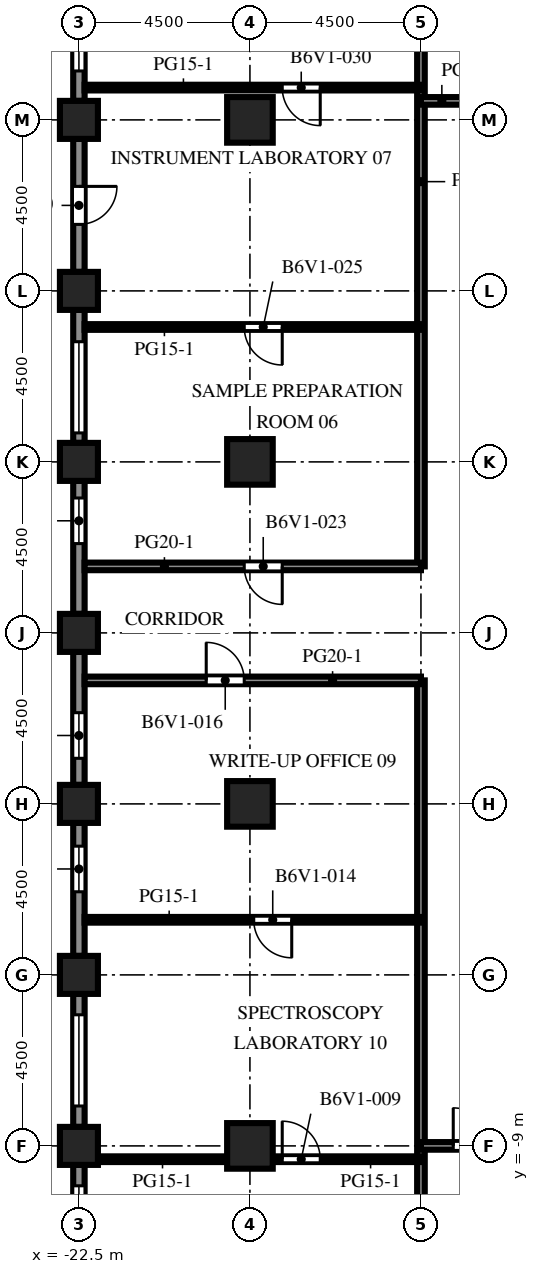
"""IFC4 building model, lengths in metres.
Left out: names, types, materials, properties, quantities, classifications, styles, units other than length and angle.
Written with IfcOpenShell. Run it as: python <this file> out.ifc"""

import sys

from ifc_helpers import new_model, si_unit, direction, frame, frame_2d, origin, origin_2d, place, context, subcontext, project, spatial, rectangle, extrude, element, fill, save


model = new_model("IFC4")
c1 = context("Model", 3, precision=1e-05, world=origin(), true_north=direction((0.0, 1.0)))
c2 = subcontext(c1, "Body", "Model", "MODEL_VIEW")
j1 = project(units=[si_unit("LENGTHUNIT", "METRE"), si_unit("PLANEANGLEUNIT", "RADIAN")], contexts=[c1])
p1 = place(None, origin())
s1 = spatial("IfcSite", under=j1, at=p1, CompositionType="ELEMENT")
p2 = place(p1, origin())
s2 = spatial("IfcBuilding", under=s1, at=p2, CompositionType="ELEMENT")
p3 = place(p2, frame((0.0, 0.0, 212.0)))
s3 = spatial("IfcBuildingStorey", under=s2, at=p3, CompositionType="ELEMENT", Elevation=212.0)
for number, where, z_axis, x_axis in (
    (1, (-22.5, -9.0, 0.0), (0.0, 0.0, 1.0), (1.0, 0.0, 0.0)),
    (2, (-22.5, -4.5, 0.0), (0.0, 0.0, 1.0), (1.0, 0.0, 0.0)),
    (3, (-22.5, 0.0, 0.0), (0.0, 0.0, 1.0), (1.0, 0.0, 0.0)),
    (4, (-22.5, 4.5, 0.0), (0.0, 0.0, 1.0), (1.0, 0.0, 0.0)),
    (5, (-22.5, 9.0, 0.0), (0.0, 0.0, 1.0), (1.0, 0.0, 0.0)),
    (6, (-22.5, 13.5, 0.0), (0.0, 0.0, 1.0), (1.0, 0.0, 0.0)),
    (7, (-22.5, 18.0, 0.0), (0.0, 0.0, 1.0), (1.0, 0.0, 0.0)),
):
    element("IfcColumn", number, at=place(p3, frame(where, z_axis=z_axis, x_axis=x_axis)), inside=s3, PredefinedType="COLUMN", context=c2, shape_type="SweptSolid", body=[
        extrude(rectangle(XDim=1.0, YDim=1.0, at=origin_2d()), origin(), (0.0, 0.0, 1.0), 4.1),
    ])
for number, where, z_axis, x_axis in (
    (8, (-18.0, -9.0, 0.0), (0.0, 0.0, 1.0), (1.0, 0.0, 0.0)),
    (9, (-18.0, 0.0, 0.0), (0.0, 0.0, 1.0), (1.0, 0.0, 0.0)),
    (10, (-18.0, 9.0, 0.0), (0.0, 0.0, 1.0), (1.0, 0.0, 0.0)),
    (11, (-18.0, 18.0, 0.0), (0.0, 0.0, 1.0), (1.0, 0.0, 0.0)),
):
    element("IfcColumn", number, at=place(p3, frame(where, z_axis=z_axis, x_axis=x_axis)), inside=s3, PredefinedType="COLUMN", context=c2, shape_type="SweptSolid", body=[
        extrude(rectangle(XDim=1.2, YDim=1.2, at=origin_2d()), origin(), (0.0, 0.0, 1.0), 4.1),
    ])
p4 = place(p3, frame((-22.5, 18.5, 0.0), z_axis=(0.0, 0.0, 1.0), x_axis=(0.0, 1.0, 0.0)))
e12 = element("IfcWall", 12, at=p4, inside=s3, PredefinedType="SOLIDWALL", context=c2, shape_type="SweptSolid", body=[
    extrude(rectangle(XDim=3.5, YDim=0.3, at=frame_2d((1.75, 0.0))), origin(), (0.0, 0.0, 1.0), 2.85),
])
p5 = place(p4, frame((0.788, 0.0, 0.8)))
e13 = element("IfcOpeningElement", 13, at=p5, cuts=e12, PredefinedType="OPENING", context=c2, shape_type="SweptSolid", body=[
    extrude(rectangle(XDim=2.4, YDim=1.7, at=frame_2d((1.2, 0.85))), frame((0.0, 0.16, 0.0), z_axis=(0.0, -1.0, 0.0), x_axis=(1.0, 0.0, 0.0)), (0.0, 0.0, 1.0), 0.32),
])
p6 = place(p3, frame((-22.5, 14.0, 0.0), z_axis=(0.0, 0.0, 1.0), x_axis=(0.0, 1.0, 0.0)))
e14 = element("IfcWall", 14, at=p6, inside=s3, PredefinedType="SOLIDWALL", context=c2, shape_type="SweptSolid", body=[
    extrude(rectangle(XDim=3.5, YDim=0.3, at=frame_2d((1.75, 0.0))), origin(), (0.0, 0.0, 1.0), 2.85),
])
p7 = place(p6, frame((1.25, 0.0, 0.0)))
e15 = element("IfcOpeningElement", 15, at=p7, cuts=e14, PredefinedType="OPENING", context=c2, shape_type="SweptSolid", body=[
    extrude(rectangle(XDim=1.0, YDim=2.2, at=frame_2d((0.5, 1.1))), frame((0.0, 0.16, 0.0), z_axis=(0.0, -1.0, 0.0), x_axis=(1.0, 0.0, 0.0)), (0.0, 0.0, 1.0), 0.32),
])
p8 = place(p3, frame((-22.5, 9.5, 0.0), z_axis=(0.0, 0.0, 1.0), x_axis=(0.0, 1.0, 0.0)))
e16 = element("IfcWall", 16, at=p8, inside=s3, PredefinedType="SOLIDWALL", context=c2, shape_type="SweptSolid", body=[
    extrude(rectangle(XDim=3.5, YDim=0.3, at=frame_2d((1.75, 0.0))), origin(), (0.0, 0.0, 1.0), 2.85),
])
p9 = place(p8, frame((0.262, 0.0, 0.8)))
e17 = element("IfcOpeningElement", 17, at=p9, cuts=e16, PredefinedType="OPENING", context=c2, shape_type="SweptSolid", body=[
    extrude(rectangle(XDim=2.4, YDim=1.7, at=frame_2d((1.2, 0.85))), frame((0.0, 0.16, 0.0), z_axis=(0.0, -1.0, 0.0), x_axis=(1.0, 0.0, 0.0)), (0.0, 0.0, 1.0), 0.32),
])
p10 = place(p3, frame((-22.5, 5.0, 0.0), z_axis=(0.0, 0.0, 1.0), x_axis=(0.0, 1.0, 0.0)))
e18 = element("IfcWall", 18, at=p10, inside=s3, PredefinedType="SOLIDWALL", context=c2, shape_type="SweptSolid", body=[
    extrude(rectangle(XDim=3.5, YDim=0.3, at=frame_2d((1.75, 0.0))), origin(), (0.0, 0.0, 1.0), 2.85),
])
p11 = place(p10, frame((1.85, 0.0, 0.8)))
e19 = element("IfcOpeningElement", 19, at=p11, cuts=e18, PredefinedType="OPENING", context=c2, shape_type="SweptSolid", body=[
    extrude(rectangle(XDim=1.2, YDim=1.7, at=frame_2d((0.6, 0.85))), frame((0.0, 0.16, 0.0), z_axis=(0.0, -1.0, 0.0), x_axis=(1.0, 0.0, 0.0)), (0.0, 0.0, 1.0), 0.32),
])
p12 = place(p3, frame((-22.5, 0.5, 0.0), z_axis=(0.0, 0.0, 1.0), x_axis=(0.0, 1.0, 0.0)))
e20 = element("IfcWall", 20, at=p12, inside=s3, PredefinedType="SOLIDWALL", context=c2, shape_type="SweptSolid", body=[
    extrude(rectangle(XDim=3.5, YDim=0.3, at=frame_2d((1.75, 0.0))), origin(), (0.0, 0.0, 1.0), 2.85),
])
p13 = place(p12, frame((0.7, 0.0, 0.8)))
e21 = element("IfcOpeningElement", 21, at=p13, cuts=e20, PredefinedType="OPENING", context=c2, shape_type="SweptSolid", body=[
    extrude(rectangle(XDim=1.2, YDim=1.7, at=frame_2d((0.6, 0.85))), frame((0.0, 0.16, 0.0), z_axis=(0.0, -1.0, 0.0), x_axis=(1.0, 0.0, 0.0)), (0.0, 0.0, 1.0), 0.32),
])
p14 = place(p3, frame((-22.5, -4.0, 0.0), z_axis=(0.0, 0.0, 1.0), x_axis=(0.0, 1.0, 0.0)))
e22 = element("IfcWall", 22, at=p14, inside=s3, PredefinedType="SOLIDWALL", context=c2, shape_type="SweptSolid", body=[
    extrude(rectangle(XDim=3.5, YDim=0.3, at=frame_2d((1.75, 0.0))), origin(), (0.0, 0.0, 1.0), 2.85),
])
p15 = place(p14, frame((1.688, 0.0, 0.8)))
e23 = element("IfcOpeningElement", 23, at=p15, cuts=e22, PredefinedType="OPENING", context=c2, shape_type="SweptSolid", body=[
    extrude(rectangle(XDim=1.2, YDim=1.7, at=frame_2d((0.6, 0.85))), frame((0.0, 0.16, 0.0), z_axis=(0.0, -1.0, 0.0), x_axis=(1.0, 0.0, 0.0)), (0.0, 0.0, 1.0), 0.32),
])
p16 = place(p3, frame((-22.5, -8.5, 0.0), z_axis=(0.0, 0.0, 1.0), x_axis=(0.0, 1.0, 0.0)))
e24 = element("IfcWall", 24, at=p16, inside=s3, PredefinedType="SOLIDWALL", context=c2, shape_type="SweptSolid", body=[
    extrude(rectangle(XDim=3.5, YDim=0.3, at=frame_2d((1.75, 0.0))), origin(), (0.0, 0.0, 1.0), 2.85),
])
p17 = place(p16, frame((0.55, 0.0, 0.8)))
e25 = element("IfcOpeningElement", 25, at=p17, cuts=e24, PredefinedType="OPENING", context=c2, shape_type="SweptSolid", body=[
    extrude(rectangle(XDim=2.4, YDim=1.7, at=frame_2d((1.2, 0.85))), frame((0.0, 0.16, 0.0), z_axis=(0.0, -1.0, 0.0), x_axis=(1.0, 0.0, 0.0)), (0.0, 0.0, 1.0), 0.32),
])
p18 = place(p3, frame((-22.5, -13.0, 0.0), z_axis=(0.0, 0.0, 1.0), x_axis=(0.0, 1.0, 0.0)))
e26 = element("IfcWall", 26, at=p18, inside=s3, PredefinedType="SOLIDWALL", context=c2, shape_type="SweptSolid", body=[
    extrude(rectangle(XDim=3.5, YDim=0.3, at=frame_2d((1.75, 0.0))), origin(), (0.0, 0.0, 1.0), 2.85),
])
p19 = place(p18, frame((0.55, 0.0, 0.8)))
e27 = element("IfcOpeningElement", 27, at=p19, cuts=e26, PredefinedType="OPENING", context=c2, shape_type="SweptSolid", body=[
    extrude(rectangle(XDim=2.4, YDim=1.7, at=frame_2d((1.2, 0.85))), frame((0.0, 0.16, 0.0), z_axis=(0.0, -1.0, 0.0), x_axis=(1.0, 0.0, 0.0)), (0.0, 0.0, 1.0), 0.32),
])
p20 = place(p3, frame((-13.5, -26.5, 0.0), z_axis=(0.0, 0.0, 1.0), x_axis=(0.0, 1.0, 0.0)))
e28 = element("IfcWall", 28, at=p20, inside=s3, PredefinedType="PARTITIONING", context=c2, shape_type="SweptSolid", body=[
    extrude(rectangle(XDim=29.75, YDim=0.2, at=frame_2d((14.875, 0.0))), origin(), (0.0, 0.0, 1.0), 3.65),
])
p21 = place(p3, frame((-13.5, 6.25, 0.0), z_axis=(0.0, 0.0, 1.0), x_axis=(0.0, 1.0, 0.0)))
e29 = element("IfcWall", 29, at=p21, inside=s3, PredefinedType="PARTITIONING", context=c2, shape_type="SweptSolid", body=[
    extrude(rectangle(XDim=20.25, YDim=0.2, at=frame_2d((10.125, 0.0))), origin(), (0.0, 0.0, 1.0), 3.65),
])
p22 = place(p3, frame((-22.0, -9.35, 0.0), z_axis=(0.0, 0.0, 1.0), x_axis=(1.0, 0.0, 0.0)))
e30 = element("IfcWall", 30, at=p22, inside=s3, PredefinedType="PARTITIONING", context=c2, shape_type="SweptSolid", body=[
    extrude(rectangle(XDim=3.4, YDim=0.15, at=frame_2d((1.7, 0.0))), origin(), (0.0, 0.0, 1.0), 3.65),
])
p23 = place(p3, frame((-13.5, -9.35, 0.0), z_axis=(0.0, 0.0, 1.0), x_axis=(-1.0, 0.0, 0.0)))
e31 = element("IfcWall", 31, at=p23, inside=s3, PredefinedType="PARTITIONING", context=c2, shape_type="SweptSolid", body=[
    extrude(rectangle(XDim=3.9, YDim=0.15, at=frame_2d((1.95, 0.0))), origin(), (0.0, 0.0, 1.0), 3.65),
])
p24 = place(p23, frame((2.65, 0.0, 0.0)))
e32 = element("IfcOpeningElement", 32, at=p24, cuts=e31, PredefinedType="OPENING", context=c2, shape_type="SweptSolid", body=[
    extrude(rectangle(XDim=1.0, YDim=2.1, at=frame_2d((0.5, 1.05))), frame((0.0, 0.085, 0.0), z_axis=(0.0, -1.0, 0.0), x_axis=(1.0, 0.0, 0.0)), (0.0, 0.0, 1.0), 0.17),
])
p25 = place(p3, frame((-10.5, -9.0, 0.0), z_axis=(0.0, 0.0, 1.0), x_axis=(-1.0, 0.0, 0.0)))
e33 = element("IfcWall", 33, at=p25, inside=s3, PredefinedType="PARTITIONING", context=c2, shape_type="SweptSolid", body=[
    extrude(rectangle(XDim=3.0, YDim=0.2, at=frame_2d((1.5, 0.0))), origin(), (0.0, 0.0, 1.0), 3.65),
])
p26 = place(p25, frame((1.15, 0.0, 0.0)))
e34 = element("IfcOpeningElement", 34, at=p26, cuts=e33, PredefinedType="OPENING", context=c2, shape_type="SweptSolid", body=[
    extrude(rectangle(XDim=1.0, YDim=2.1, at=frame_2d((0.5, 1.05))), frame((0.0, 0.11, 0.0), z_axis=(0.0, -1.0, 0.0), x_axis=(1.0, 0.0, 0.0)), (0.0, 0.0, 1.0), 0.22),
])
p27 = place(p3, frame((-13.5, -3.05, 0.0), z_axis=(0.0, 0.0, 1.0), x_axis=(-1.0, 0.0, 0.0)))
e35 = element("IfcWall", 35, at=p27, inside=s3, PredefinedType="PARTITIONING", context=c2, shape_type="SweptSolid", body=[
    extrude(rectangle(XDim=8.85, YDim=0.15, at=frame_2d((4.425, 0.0))), origin(), (0.0, 0.0, 1.0), 3.65),
])
p28 = place(p27, frame((3.4, 0.0, 0.0)))
e36 = element("IfcOpeningElement", 36, at=p28, cuts=e35, PredefinedType="OPENING", context=c2, shape_type="SweptSolid", body=[
    extrude(rectangle(XDim=1.0, YDim=2.1, at=frame_2d((0.5, 1.05))), frame((0.0, 0.085, 0.0), z_axis=(0.0, -1.0, 0.0), x_axis=(1.0, 0.0, 0.0)), (0.0, 0.0, 1.0), 0.17),
])
p29 = place(p3, frame((-13.5, 3.25, 0.0), z_axis=(0.0, 0.0, 1.0), x_axis=(-1.0, 0.0, 0.0)))
e37 = element("IfcWall", 37, at=p29, inside=s3, PredefinedType="PARTITIONING", context=c2, shape_type="SweptSolid", body=[
    extrude(rectangle(XDim=8.85, YDim=0.2, at=frame_2d((4.425, 0.0))), origin(), (0.0, 0.0, 1.0), 3.65),
])
p30 = place(p29, frame((4.65, 0.0, 0.0)))
e38 = element("IfcOpeningElement", 38, at=p30, cuts=e37, PredefinedType="OPENING", context=c2, shape_type="SweptSolid", body=[
    extrude(rectangle(XDim=1.0, YDim=2.1, at=frame_2d((0.5, 1.05))), frame((0.0, 0.11, 0.0), z_axis=(0.0, -1.0, 0.0), x_axis=(1.0, 0.0, 0.0)), (0.0, 0.0, 1.0), 0.22),
])
p31 = place(p3, frame((-22.35, 6.25, 0.0), z_axis=(0.0, 0.0, 1.0), x_axis=(1.0, 0.0, 0.0)))
e39 = element("IfcWall", 39, at=p31, inside=s3, PredefinedType="PARTITIONING", context=c2, shape_type="SweptSolid", body=[
    extrude(rectangle(XDim=8.85, YDim=0.2, at=frame_2d((4.425, 0.0))), origin(), (0.0, 0.0, 1.0), 3.65),
])
p32 = place(p31, frame((4.2, 0.0, 0.0)))
e40 = element("IfcOpeningElement", 40, at=p32, cuts=e39, PredefinedType="OPENING", context=c2, shape_type="SweptSolid", body=[
    extrude(rectangle(XDim=1.0, YDim=2.1, at=frame_2d((0.5, 1.05))), frame((0.0, 0.11, 0.0), z_axis=(0.0, -1.0, 0.0), x_axis=(1.0, 0.0, 0.0)), (0.0, 0.0, 1.0), 0.22),
])
p33 = place(p3, frame((-22.35, 12.55, 0.0), z_axis=(0.0, 0.0, 1.0), x_axis=(1.0, 0.0, 0.0)))
e41 = element("IfcWall", 41, at=p33, inside=s3, PredefinedType="PARTITIONING", context=c2, shape_type="SweptSolid", body=[
    extrude(rectangle(XDim=8.85, YDim=0.15, at=frame_2d((4.425, 0.0))), origin(), (0.0, 0.0, 1.0), 3.65),
])
p34 = place(p33, frame((4.2, 0.0, 0.0)))
e42 = element("IfcOpeningElement", 42, at=p34, cuts=e41, PredefinedType="OPENING", context=c2, shape_type="SweptSolid", body=[
    extrude(rectangle(XDim=1.0, YDim=2.1, at=frame_2d((0.5, 1.05))), frame((0.0, 0.085, 0.0), z_axis=(0.0, -1.0, 0.0), x_axis=(1.0, 0.0, 0.0)), (0.0, 0.0, 1.0), 0.17),
])
p35 = place(p3, frame((-13.5, 18.5, 0.0), z_axis=(0.0, 0.0, 1.0), x_axis=(1.0, 0.0, 0.0)))
e43 = element("IfcWall", 43, at=p35, inside=s3, PredefinedType="PARTITIONING", context=c2, shape_type="SweptSolid", body=[
    extrude(rectangle(XDim=3.0, YDim=0.2, at=frame_2d((1.5, 0.0))), origin(), (0.0, 0.0, 1.0), 3.65),
])
p36 = place(p35, frame((1.1, 0.0, 0.0)))
e44 = element("IfcOpeningElement", 44, at=p36, cuts=e43, PredefinedType="OPENING", context=c2, shape_type="SweptSolid", body=[
    extrude(rectangle(XDim=1.0, YDim=2.1, at=frame_2d((0.5, 1.05))), frame((0.0, 0.11, 0.0), z_axis=(0.0, -1.0, 0.0), x_axis=(1.0, 0.0, 0.0)), (0.0, 0.0, 1.0), 0.22),
])
p37 = place(p3, frame((-22.35, 18.85, 0.0), z_axis=(0.0, 0.0, 1.0), x_axis=(1.0, 0.0, 0.0)))
e45 = element("IfcWall", 45, at=p37, inside=s3, PredefinedType="PARTITIONING", context=c2, shape_type="SweptSolid", body=[
    extrude(rectangle(XDim=8.85, YDim=0.15, at=frame_2d((4.425, 0.0))), origin(), (0.0, 0.0, 1.0), 3.65),
])
p38 = place(p37, frame((5.2, 0.0, 0.0)))
e46 = element("IfcOpeningElement", 46, at=p38, cuts=e45, PredefinedType="OPENING", context=c2, shape_type="SweptSolid", body=[
    extrude(rectangle(XDim=1.0, YDim=2.1, at=frame_2d((0.5, 1.05))), frame((0.0, 0.085, 0.0), z_axis=(0.0, -1.0, 0.0), x_axis=(1.0, 0.0, 0.0)), (0.0, 0.0, 1.0), 0.17),
])
p39 = place(p5, origin())
e47 = element("IfcWindow", 47, at=p39, inside=s3, PartitioningType="SINGLE_PANEL", PredefinedType="WINDOW", context=c2, shape_type="SweptSolid", body=[
    extrude(rectangle(XDim=2.4, YDim=1.7, at=frame_2d((1.2, 0.85))), frame((0.0, 0.03, 0.0), z_axis=(0.0, -1.0, 0.0), x_axis=(1.0, 0.0, 0.0)), (0.0, 0.0, 1.0), 0.06),
])
fill(e13, e47)
p40 = place(p7, origin())
e48 = element("IfcDoor", 48, at=p40, inside=s3, OperationType="SINGLE_SWING_RIGHT", PredefinedType="DOOR", context=c2, shape_type="SweptSolid", body=[
    extrude(rectangle(XDim=1.0, YDim=2.2, at=frame_2d((0.5, 1.1))), frame((0.0, 0.025, 0.0), z_axis=(0.0, -1.0, 0.0), x_axis=(1.0, 0.0, 0.0)), (0.0, 0.0, 1.0), 0.05),
])
fill(e15, e48)
p41 = place(p9, origin())
e49 = element("IfcWindow", 49, at=p41, inside=s3, PartitioningType="SINGLE_PANEL", PredefinedType="WINDOW", context=c2, shape_type="SweptSolid", body=[
    extrude(rectangle(XDim=2.4, YDim=1.7, at=frame_2d((1.2, 0.85))), frame((0.0, 0.03, 0.0), z_axis=(0.0, -1.0, 0.0), x_axis=(1.0, 0.0, 0.0)), (0.0, 0.0, 1.0), 0.06),
])
fill(e17, e49)
p42 = place(p11, origin())
e50 = element("IfcWindow", 50, at=p42, inside=s3, PartitioningType="SINGLE_PANEL", PredefinedType="WINDOW", context=c2, shape_type="SweptSolid", body=[
    extrude(rectangle(XDim=1.2, YDim=1.7, at=frame_2d((0.6, 0.85))), frame((0.0, 0.03, 0.0), z_axis=(0.0, -1.0, 0.0), x_axis=(1.0, 0.0, 0.0)), (0.0, 0.0, 1.0), 0.06),
])
fill(e19, e50)
p43 = place(p13, origin())
e51 = element("IfcWindow", 51, at=p43, inside=s3, PartitioningType="SINGLE_PANEL", PredefinedType="WINDOW", context=c2, shape_type="SweptSolid", body=[
    extrude(rectangle(XDim=1.2, YDim=1.7, at=frame_2d((0.6, 0.85))), frame((0.0, 0.03, 0.0), z_axis=(0.0, -1.0, 0.0), x_axis=(1.0, 0.0, 0.0)), (0.0, 0.0, 1.0), 0.06),
])
fill(e21, e51)
p44 = place(p15, origin())
e52 = element("IfcWindow", 52, at=p44, inside=s3, PartitioningType="SINGLE_PANEL", PredefinedType="WINDOW", context=c2, shape_type="SweptSolid", body=[
    extrude(rectangle(XDim=1.2, YDim=1.7, at=frame_2d((0.6, 0.85))), frame((0.0, 0.03, 0.0), z_axis=(0.0, -1.0, 0.0), x_axis=(1.0, 0.0, 0.0)), (0.0, 0.0, 1.0), 0.06),
])
fill(e23, e52)
p45 = place(p17, origin())
e53 = element("IfcWindow", 53, at=p45, inside=s3, PartitioningType="SINGLE_PANEL", PredefinedType="WINDOW", context=c2, shape_type="SweptSolid", body=[
    extrude(rectangle(XDim=2.4, YDim=1.7, at=frame_2d((1.2, 0.85))), frame((0.0, 0.03, 0.0), z_axis=(0.0, -1.0, 0.0), x_axis=(1.0, 0.0, 0.0)), (0.0, 0.0, 1.0), 0.06),
])
fill(e25, e53)
p46 = place(p19, origin())
e54 = element("IfcWindow", 54, at=p46, inside=s3, PartitioningType="SINGLE_PANEL", PredefinedType="WINDOW", context=c2, shape_type="SweptSolid", body=[
    extrude(rectangle(XDim=2.4, YDim=1.7, at=frame_2d((1.2, 0.85))), frame((0.0, 0.03, 0.0), z_axis=(0.0, -1.0, 0.0), x_axis=(1.0, 0.0, 0.0)), (0.0, 0.0, 1.0), 0.06),
])
fill(e27, e54)
p47 = place(p24, origin())
e55 = element("IfcDoor", 55, at=p47, inside=s3, OperationType="SINGLE_SWING_RIGHT", PredefinedType="DOOR", context=c2, shape_type="SweptSolid", body=[
    extrude(rectangle(XDim=1.0, YDim=2.1, at=frame_2d((0.5, 1.05))), frame((0.0, 0.025, 0.0), z_axis=(0.0, -1.0, 0.0), x_axis=(1.0, 0.0, 0.0)), (0.0, 0.0, 1.0), 0.05),
])
fill(e32, e55)
p48 = place(p26, origin())
e56 = element("IfcDoor", 56, at=p48, inside=s3, OperationType="SINGLE_SWING_RIGHT", PredefinedType="DOOR", context=c2, shape_type="SweptSolid", body=[
    extrude(rectangle(XDim=1.0, YDim=2.1, at=frame_2d((0.5, 1.05))), frame((0.0, 0.025, 0.0), z_axis=(0.0, -1.0, 0.0), x_axis=(1.0, 0.0, 0.0)), (0.0, 0.0, 1.0), 0.05),
])
fill(e34, e56)
p49 = place(p28, origin())
e57 = element("IfcDoor", 57, at=p49, inside=s3, OperationType="SINGLE_SWING_LEFT", PredefinedType="DOOR", context=c2, shape_type="SweptSolid", body=[
    extrude(rectangle(XDim=1.0, YDim=2.1, at=frame_2d((0.5, 1.05))), frame((0.0, 0.025, 0.0), z_axis=(0.0, -1.0, 0.0), x_axis=(1.0, 0.0, 0.0)), (0.0, 0.0, 1.0), 0.05),
])
fill(e36, e57)
p50 = place(p30, origin())
e58 = element("IfcDoor", 58, at=p50, inside=s3, OperationType="SINGLE_SWING_RIGHT", PredefinedType="DOOR", context=c2, shape_type="SweptSolid", body=[
    extrude(rectangle(XDim=1.0, YDim=2.1, at=frame_2d((0.5, 1.05))), frame((0.0, 0.025, 0.0), z_axis=(0.0, -1.0, 0.0), x_axis=(1.0, 0.0, 0.0)), (0.0, 0.0, 1.0), 0.05),
])
fill(e38, e58)
p51 = place(p32, origin())
e59 = element("IfcDoor", 59, at=p51, inside=s3, OperationType="SINGLE_SWING_RIGHT", PredefinedType="DOOR", context=c2, shape_type="SweptSolid", body=[
    extrude(rectangle(XDim=1.0, YDim=2.1, at=frame_2d((0.5, 1.05))), frame((0.0, 0.025, 0.0), z_axis=(0.0, -1.0, 0.0), x_axis=(1.0, 0.0, 0.0)), (0.0, 0.0, 1.0), 0.05),
])
fill(e40, e59)
p52 = place(p34, origin())
e60 = element("IfcDoor", 60, at=p52, inside=s3, OperationType="SINGLE_SWING_RIGHT", PredefinedType="DOOR", context=c2, shape_type="SweptSolid", body=[
    extrude(rectangle(XDim=1.0, YDim=2.1, at=frame_2d((0.5, 1.05))), frame((0.0, 0.025, 0.0), z_axis=(0.0, -1.0, 0.0), x_axis=(1.0, 0.0, 0.0)), (0.0, 0.0, 1.0), 0.05),
])
fill(e42, e60)
p53 = place(p38, origin())
e61 = element("IfcDoor", 61, at=p53, inside=s3, OperationType="SINGLE_SWING_RIGHT", PredefinedType="DOOR", context=c2, shape_type="SweptSolid", body=[
    extrude(rectangle(XDim=1.0, YDim=2.1, at=frame_2d((0.5, 1.05))), frame((0.0, 0.025, 0.0), z_axis=(0.0, -1.0, 0.0), x_axis=(1.0, 0.0, 0.0)), (0.0, 0.0, 1.0), 0.05),
])
fill(e46, e61)
save(model, sys.argv[1])
